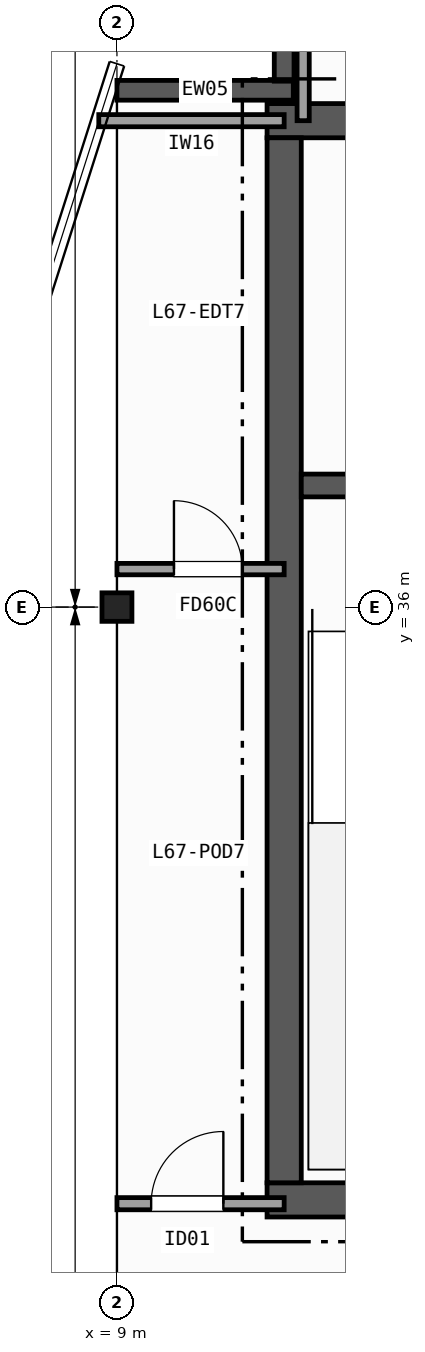
"""IFC4 building model, lengths in metres.
Left out: names, types, materials, properties, quantities, classifications, styles, units other than length and angle.
Written with IfcOpenShell. Run it as: python <this file> out.ifc"""

import sys

from ifc_helpers import new_model, si_unit, direction, frame, frame_2d, origin, origin_2d, place, context, subcontext, project, spatial, rectangle, i_section, extrude, element, fill, save


model = new_model("IFC4")
c1 = context("Model", 3, precision=1e-05, world=origin(), true_north=direction((0.0, 1.0)))
c2 = subcontext(c1, "Body", "Model", "MODEL_VIEW")
j1 = project(units=[si_unit("LENGTHUNIT", "METRE"), si_unit("PLANEANGLEUNIT", "RADIAN")], contexts=[c1])
p1 = place(None, origin())
s1 = spatial("IfcSite", under=j1, at=p1, CompositionType="ELEMENT")
p2 = place(p1, origin())
s2 = spatial("IfcBuilding", under=s1, at=p2, CompositionType="ELEMENT")
p3 = place(p2, frame((0.0, 0.0, 266.7)))
s3 = spatial("IfcBuildingStorey", under=s2, at=p3, CompositionType="ELEMENT", Elevation=266.7)
p4 = place(p3, frame((9.0, 36.0, 0.0), z_axis=(0.0, 0.0, 1.0), x_axis=(1.0, 0.0, 0.0)))
e1 = element("IfcColumn", 1, at=p4, inside=s3, PredefinedType="COLUMN", context=c2, shape_type="SweptSolid", body=[
    extrude(i_section(OverallWidth=0.394, OverallDepth=0.375, WebThickness=0.017, FlangeThickness=0.028, FilletRadius=0.015, at=origin_2d()), origin(), (0.0, 0.0, 1.0), 3.7),
])
p5 = place(p3, frame((9.0, 42.8, 0.0), z_axis=(0.0, 0.0, 1.0), x_axis=(1.0, 0.0, 0.0)))
e2 = element("IfcWall", 2, at=p5, inside=s3, PredefinedType="SOLIDWALL", context=c2, shape_type="SweptSolid", body=[
    extrude(rectangle(XDim=2.32, YDim=0.26, at=frame_2d((1.16, 0.0))), origin(), (0.0, 0.0, 1.0), 3.42),
])
p6 = place(p3, frame((11.2, 42.92, 0.0), z_axis=(0.0, 0.0, 1.0), x_axis=(0.0, 1.0, 0.0)))
e3 = element("IfcWall", 3, at=p6, inside=s3, PredefinedType="SOLIDWALL", context=c2, shape_type="SweptSolid", body=[
    extrude(rectangle(XDim=2.08, YDim=0.26, at=frame_2d((1.04, 0.0))), origin(), (0.0, 0.0, 1.0), 3.42),
])
p7 = place(p3, frame((10.975, 28.2, 0.0), z_axis=(0.0, 0.0, 1.0), x_axis=(1.0, 0.0, 0.0)))
e4 = element("IfcWall", 4, at=p7, inside=s3, PredefinedType="SHEAR", context=c2, shape_type="SweptSolid", body=[
    extrude(rectangle(XDim=13.85, YDim=0.45, at=frame_2d((6.925, 0.0))), origin(), (0.0, 0.0, 1.0), 3.42),
])
p8 = place(p3, frame((24.825, 42.4, 0.0), z_axis=(0.0, 0.0, 1.0), x_axis=(-1.0, 0.0, 0.0)))
e5 = element("IfcWall", 5, at=p8, inside=s3, PredefinedType="SHEAR", context=c2, shape_type="SweptSolid", body=[
    extrude(rectangle(XDim=13.85, YDim=0.45, at=frame_2d((6.925, 0.0))), origin(), (0.0, 0.0, 1.0), 3.42),
])
p9 = place(p8, frame((10.025, 0.0, 0.0)))
e6 = element("IfcOpeningElement", 6, at=p9, cuts=e5, PredefinedType="OPENING", context=c2, shape_type="SweptSolid", body=[
    extrude(rectangle(XDim=1.2, YDim=2.15, at=frame_2d((0.6, 1.075))), frame((0.0, 0.235, 0.0), z_axis=(0.0, -1.0, 0.0), x_axis=(1.0, 0.0, 0.0)), (0.0, 0.0, 1.0), 0.47),
])
p10 = place(p8, frame((2.975, 0.0, 0.0)))
e7 = element("IfcOpeningElement", 7, at=p10, cuts=e5, PredefinedType="OPENING", context=c2, shape_type="SweptSolid", body=[
    extrude(rectangle(XDim=0.9, YDim=2.1, at=frame_2d((0.45, 1.05))), frame((0.0, 0.235, 0.0), z_axis=(0.0, -1.0, 0.0), x_axis=(1.0, 0.0, 0.0)), (0.0, 0.0, 1.0), 0.47),
])
p11 = place(p3, frame((11.2, 42.175, 0.0), z_axis=(0.0, 0.0, 1.0), x_axis=(0.0, -1.0, 0.0)))
e8 = element("IfcWall", 8, at=p11, inside=s3, PredefinedType="SHEAR", context=c2, shape_type="SweptSolid", body=[
    extrude(rectangle(XDim=13.75, YDim=0.45, at=frame_2d((6.875, 0.0))), origin(), (0.0, 0.0, 1.0), 3.42),
])
p12 = place(p3, frame((17.77, 37.6, 0.0), z_axis=(0.0, 0.0, 1.0), x_axis=(-1.0, 0.0, 0.0)))
e9 = element("IfcWall", 9, at=p12, inside=s3, PredefinedType="SHEAR", context=c2, shape_type="SweptSolid", body=[
    extrude(rectangle(XDim=6.345, YDim=0.3, at=frame_2d((3.172, 0.0))), origin(), (0.0, 0.0, 1.0), 3.42),
])
p13 = place(p12, frame((4.22, 0.0, 0.0)))
e10 = element("IfcOpeningElement", 10, at=p13, cuts=e9, PredefinedType="OPENING", context=c2, shape_type="SweptSolid", body=[
    extrude(rectangle(XDim=1.2, YDim=2.15, at=frame_2d((0.6, 1.075))), frame((0.0, 0.16, 0.0), z_axis=(0.0, -1.0, 0.0), x_axis=(1.0, 0.0, 0.0)), (0.0, 0.0, 1.0), 0.32),
])
p14 = place(p12, frame((1.12, 0.0, 0.0)))
e11 = element("IfcOpeningElement", 11, at=p14, cuts=e9, PredefinedType="OPENING", context=c2, shape_type="SweptSolid", body=[
    extrude(rectangle(XDim=1.2, YDim=2.15, at=frame_2d((0.6, 1.075))), frame((0.0, 0.16, 0.0), z_axis=(0.0, -1.0, 0.0), x_axis=(1.0, 0.0, 0.0)), (0.0, 0.0, 1.0), 0.32),
])
p15 = place(p3, frame((9.0, 28.15, 0.0), z_axis=(0.0, 0.0, 1.0), x_axis=(1.0, 0.0, 0.0)))
e12 = element("IfcWall", 12, at=p15, inside=s3, PredefinedType="PARTITIONING", context=c2, shape_type="SweptSolid", body=[
    extrude(rectangle(XDim=2.2, YDim=0.16, at=frame_2d((1.1, 0.0))), origin(), (0.0, 0.0, 1.0), 2.707),
])
p16 = place(p15, frame((0.45, 0.0, 0.0)))
e13 = element("IfcOpeningElement", 13, at=p16, cuts=e12, PredefinedType="OPENING", context=c2, shape_type="SweptSolid", body=[
    extrude(rectangle(XDim=0.95, YDim=2.1, at=frame_2d((0.475, 1.05))), frame((0.0, 0.09, 0.0), z_axis=(0.0, -1.0, 0.0), x_axis=(1.0, 0.0, 0.0)), (0.0, 0.0, 1.0), 0.18),
])
p17 = place(p3, frame((8.761, 42.4, 0.0), z_axis=(0.0, 0.0, 1.0), x_axis=(1.0, 0.0, 0.0)))
e14 = element("IfcWall", 14, at=p17, inside=s3, PredefinedType="PARTITIONING", context=c2, shape_type="SweptSolid", body=[
    extrude(rectangle(XDim=2.439, YDim=0.16, at=frame_2d((1.219, 0.0))), origin(), (0.0, 0.0, 1.0), 3.42),
])
p18 = place(p3, frame((11.45, 42.4, 0.0), z_axis=(0.0, 0.0, 1.0), x_axis=(0.0, 1.0, 0.0)))
e15 = element("IfcWall", 15, at=p18, inside=s3, PredefinedType="PARTITIONING", context=c2, shape_type="SweptSolid", body=[
    extrude(rectangle(XDim=2.666, YDim=0.16, at=frame_2d((1.333, 0.0))), origin(), (0.0, 0.0, 1.0), 3.42),
])
p19 = place(p3, frame((9.0, 36.5, 0.0), z_axis=(0.0, 0.0, 1.0), x_axis=(1.0, 0.0, 0.0)))
e16 = element("IfcWall", 16, at=p19, inside=s3, PredefinedType="PARTITIONING", context=c2, shape_type="SweptSolid", body=[
    extrude(rectangle(XDim=2.2, YDim=0.15, at=frame_2d((1.1, 0.0))), origin(), (0.0, 0.0, 1.0), 3.42),
])
p20 = place(p19, frame((0.75, 0.0, 0.0)))
e17 = element("IfcOpeningElement", 17, at=p20, cuts=e16, PredefinedType="OPENING", context=c2, shape_type="SweptSolid", body=[
    extrude(rectangle(XDim=0.9, YDim=2.1, at=frame_2d((0.45, 1.05))), frame((0.0, 0.085, 0.0), z_axis=(0.0, -1.0, 0.0), x_axis=(1.0, 0.0, 0.0)), (0.0, 0.0, 1.0), 0.17),
])
p21 = place(p16, origin())
e18 = element("IfcDoor", 18, at=p21, inside=s3, OperationType="SINGLE_SWING_RIGHT", PredefinedType="DOOR", context=c2, shape_type="SweptSolid", body=[
    extrude(rectangle(XDim=0.95, YDim=2.1, at=frame_2d((0.475, 1.05))), frame((0.0, 0.025, 0.0), z_axis=(0.0, -1.0, 0.0), x_axis=(1.0, 0.0, 0.0)), (0.0, 0.0, 1.0), 0.05),
])
fill(e13, e18)
p22 = place(p20, origin())
e19 = element("IfcDoor", 19, at=p22, inside=s3, OperationType="SINGLE_SWING_LEFT", PredefinedType="DOOR", context=c2, shape_type="SweptSolid", body=[
    extrude(rectangle(XDim=0.9, YDim=2.1, at=frame_2d((0.45, 1.05))), frame((0.0, 0.025, 0.0), z_axis=(0.0, -1.0, 0.0), x_axis=(1.0, 0.0, 0.0)), (0.0, 0.0, 1.0), 0.05),
])
fill(e17, e19)
save(model, sys.argv[1])
